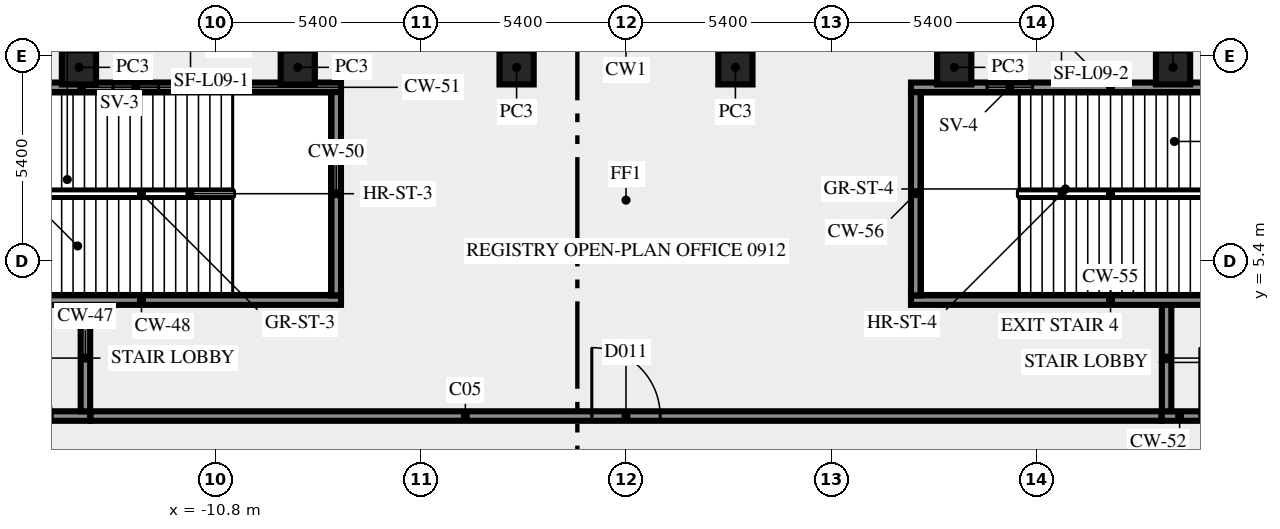
"""IFC4 building model, lengths in metres.
Left out: names, types, materials, properties, quantities, classifications, styles, units other than length and angle.
Written with IfcOpenShell. Run it as: python <this file> out.ifc"""

import sys

from ifc_helpers import new_model, si_unit, direction, frame, frame_2d, origin, origin_2d, place, context, subcontext, project, spatial, rectangle, extrude, element, fill, save


model = new_model("IFC4")
c1 = context("Model", 3, precision=1e-05, world=origin(), true_north=direction((0.0, 1.0)))
c2 = subcontext(c1, "Body", "Model", "MODEL_VIEW")
j1 = project(units=[si_unit("LENGTHUNIT", "METRE"), si_unit("PLANEANGLEUNIT", "RADIAN")], contexts=[c1])
p1 = place(None, origin())
s1 = spatial("IfcSite", under=j1, at=p1, CompositionType="ELEMENT")
p2 = place(p1, origin())
s2 = spatial("IfcBuilding", under=s1, at=p2, CompositionType="ELEMENT")
p3 = place(p2, frame((0.0, 0.0, 43.0)))
s3 = spatial("IfcBuildingStorey", under=s2, at=p3, CompositionType="ELEMENT", Elevation=43.0)
for number, where, z_axis, x_axis in (
    (1, (14.395, 10.5, 0.0), (0.0, 0.0, 1.0), (-1.0, 0.0, 0.0)),
    (2, (8.637, 10.5, 0.0), (0.0, 0.0, 1.0), (-1.0, 0.0, 0.0)),
    (3, (2.879, 10.5, 0.0), (0.0, 0.0, 1.0), (-1.0, 0.0, 0.0)),
    (4, (-2.879, 10.5, 0.0), (0.0, 0.0, 1.0), (-1.0, 0.0, 0.0)),
    (5, (-8.637, 10.5, 0.0), (0.0, 0.0, 1.0), (-1.0, 0.0, 0.0)),
    (6, (-14.395, 10.5, 0.0), (0.0, 0.0, 1.0), (-1.0, 0.0, 0.0)),
):
    element("IfcColumn", number, at=place(p3, frame(where, z_axis=z_axis, x_axis=x_axis)), inside=s3, PredefinedType="COLUMN", context=c2, shape_type="SweptSolid", body=[
        extrude(rectangle(XDim=0.9, YDim=0.9, at=origin_2d()), origin(), (0.0, 0.0, 1.0), 3.65),
    ])
p4 = place(p3, frame((-18.0, 1.325, 0.0), z_axis=(0.0, 0.0, 1.0), x_axis=(1.0, 0.0, 0.0)))
e7 = element("IfcWall", 7, at=p4, inside=s3, PredefinedType="SHEAR", context=c2, shape_type="SweptSolid", body=[
    extrude(rectangle(XDim=3.9, YDim=0.25, at=frame_2d((1.95, 0.0))), origin(), (0.0, 0.0, 1.0), 3.65),
])
p5 = place(p4, frame((1.1, 0.0, 0.0)))
e8 = element("IfcOpeningElement", 8, at=p5, cuts=e7, PredefinedType="OPENING", context=c2, shape_type="SweptSolid", body=[
    extrude(rectangle(XDim=1.8, YDim=2.1, at=frame_2d((0.9, 1.05))), frame((0.0, 0.135, 0.0), z_axis=(0.0, -1.0, 0.0), x_axis=(1.0, 0.0, 0.0)), (0.0, 0.0, 1.0), 0.27),
])
p6 = place(p3, frame((-14.225, 1.45, 0.0), z_axis=(0.0, 0.0, 1.0), x_axis=(0.0, 1.0, 0.0)))
e9 = element("IfcWall", 9, at=p6, inside=s3, PredefinedType="SHEAR", context=c2, shape_type="SweptSolid", body=[
    extrude(rectangle(XDim=2.8, YDim=0.25, at=frame_2d((1.4, 0.0))), origin(), (0.0, 0.0, 1.0), 3.65),
])
p7 = place(p3, frame((-18.0, 4.375, 0.0), z_axis=(0.0, 0.0, 1.0), x_axis=(1.0, 0.0, 0.0)))
e10 = element("IfcWall", 10, at=p7, inside=s3, PredefinedType="SHEAR", context=c2, shape_type="SweptSolid", body=[
    extrude(rectangle(XDim=10.5, YDim=0.25, at=frame_2d((5.25, 0.0))), origin(), (0.0, 0.0, 1.0), 3.65),
])
p8 = place(p7, frame((0.3, 0.0, 0.0)))
e11 = element("IfcOpeningElement", 11, at=p8, cuts=e10, PredefinedType="OPENING", context=c2, shape_type="SweptSolid", body=[
    extrude(rectangle(XDim=1.8, YDim=2.1, at=frame_2d((0.9, 1.05))), frame((0.0, 0.135, 0.0), z_axis=(0.0, -1.0, 0.0), x_axis=(1.0, 0.0, 0.0)), (0.0, 0.0, 1.0), 0.27),
])
p9 = place(p3, frame((-7.625, 4.5, 0.0), z_axis=(0.0, 0.0, 1.0), x_axis=(0.0, 1.0, 0.0)))
e12 = element("IfcWall", 12, at=p9, inside=s3, PredefinedType="SHEAR", context=c2, shape_type="SweptSolid", body=[
    extrude(rectangle(XDim=5.35, YDim=0.25, at=frame_2d((2.675, 0.0))), origin(), (0.0, 0.0, 1.0), 3.65),
])
p10 = place(p3, frame((-18.0, 9.975, 0.0), z_axis=(0.0, 0.0, 1.0), x_axis=(1.0, 0.0, 0.0)))
e13 = element("IfcWall", 13, at=p10, inside=s3, PredefinedType="SHEAR", context=c2, shape_type="SweptSolid", body=[
    extrude(rectangle(XDim=10.5, YDim=0.25, at=frame_2d((5.25, 0.0))), origin(), (0.0, 0.0, 1.0), 3.65),
])
p11 = place(p10, frame((4.5, 0.0, 1.0)))
e14 = element("IfcOpeningElement", 14, at=p11, cuts=e13, PredefinedType="OPENING", context=c2, shape_type="SweptSolid", body=[
    extrude(rectangle(XDim=1.2, YDim=1.2, at=frame_2d((0.6, 0.6))), frame((0.0, 0.135, 0.0), z_axis=(0.0, -1.0, 0.0), x_axis=(1.0, 0.0, 0.0)), (0.0, 0.0, 1.0), 0.27),
])
p12 = place(p3, frame((14.1, 1.325, 0.0), z_axis=(0.0, 0.0, 1.0), x_axis=(1.0, 0.0, 0.0)))
e15 = element("IfcWall", 15, at=p12, inside=s3, PredefinedType="SHEAR", context=c2, shape_type="SweptSolid", body=[
    extrude(rectangle(XDim=3.9, YDim=0.25, at=frame_2d((1.95, 0.0))), origin(), (0.0, 0.0, 1.0), 3.65),
])
p13 = place(p12, frame((1.0, 0.0, 0.0)))
e16 = element("IfcOpeningElement", 16, at=p13, cuts=e15, PredefinedType="OPENING", context=c2, shape_type="SweptSolid", body=[
    extrude(rectangle(XDim=1.8, YDim=2.1, at=frame_2d((0.9, 1.05))), frame((0.0, 0.135, 0.0), z_axis=(0.0, -1.0, 0.0), x_axis=(1.0, 0.0, 0.0)), (0.0, 0.0, 1.0), 0.27),
])
p14 = place(p3, frame((14.225, 1.45, 0.0), z_axis=(0.0, 0.0, 1.0), x_axis=(0.0, 1.0, 0.0)))
e17 = element("IfcWall", 17, at=p14, inside=s3, PredefinedType="SHEAR", context=c2, shape_type="SweptSolid", body=[
    extrude(rectangle(XDim=2.8, YDim=0.25, at=frame_2d((1.4, 0.0))), origin(), (0.0, 0.0, 1.0), 3.65),
])
p15 = place(p3, frame((7.5, 4.375, 0.0), z_axis=(0.0, 0.0, 1.0), x_axis=(1.0, 0.0, 0.0)))
e18 = element("IfcWall", 18, at=p15, inside=s3, PredefinedType="SHEAR", context=c2, shape_type="SweptSolid", body=[
    extrude(rectangle(XDim=10.5, YDim=0.25, at=frame_2d((5.25, 0.0))), origin(), (0.0, 0.0, 1.0), 3.65),
])
p16 = place(p15, frame((8.4, 0.0, 0.0)))
e19 = element("IfcOpeningElement", 19, at=p16, cuts=e18, PredefinedType="OPENING", context=c2, shape_type="SweptSolid", body=[
    extrude(rectangle(XDim=1.8, YDim=2.1, at=frame_2d((0.9, 1.05))), frame((0.0, 0.135, 0.0), z_axis=(0.0, -1.0, 0.0), x_axis=(1.0, 0.0, 0.0)), (0.0, 0.0, 1.0), 0.27),
])
p17 = place(p3, frame((7.625, 4.5, 0.0), z_axis=(0.0, 0.0, 1.0), x_axis=(0.0, 1.0, 0.0)))
e20 = element("IfcWall", 20, at=p17, inside=s3, PredefinedType="SHEAR", context=c2, shape_type="SweptSolid", body=[
    extrude(rectangle(XDim=5.35, YDim=0.25, at=frame_2d((2.675, 0.0))), origin(), (0.0, 0.0, 1.0), 3.65),
])
p18 = place(p3, frame((7.5, 9.975, 0.0), z_axis=(0.0, 0.0, 1.0), x_axis=(1.0, 0.0, 0.0)))
e21 = element("IfcWall", 21, at=p18, inside=s3, PredefinedType="SHEAR", context=c2, shape_type="SweptSolid", body=[
    extrude(rectangle(XDim=10.5, YDim=0.25, at=frame_2d((5.25, 0.0))), origin(), (0.0, 0.0, 1.0), 3.65),
])
p19 = place(p18, frame((2.0, 0.0, 1.0)))
e22 = element("IfcOpeningElement", 22, at=p19, cuts=e21, PredefinedType="OPENING", context=c2, shape_type="SweptSolid", body=[
    extrude(rectangle(XDim=1.2, YDim=1.2, at=frame_2d((0.6, 0.6))), frame((0.0, 0.135, 0.0), z_axis=(0.0, -1.0, 0.0), x_axis=(1.0, 0.0, 0.0)), (0.0, 0.0, 1.0), 0.27),
])
p20 = place(p3, frame((-14.09, 1.325, 0.0), z_axis=(0.0, 0.0, 1.0), x_axis=(1.0, 0.0, 0.0)))
e23 = element("IfcWall", 23, at=p20, inside=s3, PredefinedType="SOLIDWALL", context=c2, shape_type="SweptSolid", body=[
    extrude(rectangle(XDim=28.18, YDim=0.25, at=frame_2d((14.09, 0.0))), origin(), (0.0, 0.0, 1.0), 3.65),
])
p21 = place(p20, frame((13.19, 0.0, 0.0)))
e24 = element("IfcOpeningElement", 24, at=p21, cuts=e23, PredefinedType="OPENING", context=c2, shape_type="SweptSolid", body=[
    extrude(rectangle(XDim=1.8, YDim=2.1, at=frame_2d((0.9, 1.05))), frame((0.0, 0.135, 0.0), z_axis=(0.0, -1.0, 0.0), x_axis=(1.0, 0.0, 0.0)), (0.0, 0.0, 1.0), 0.27),
])
p22 = place(p5, origin())
e25 = element("IfcDoor", 25, at=p22, inside=s3, OperationType="DOUBLE_DOOR_SINGLE_SWING", PredefinedType="DOOR", context=c2, shape_type="SweptSolid", body=[
    extrude(rectangle(XDim=1.8, YDim=2.1, at=frame_2d((0.9, 1.05))), frame((0.0, 0.025, 0.0), z_axis=(0.0, -1.0, 0.0), x_axis=(1.0, 0.0, 0.0)), (0.0, 0.0, 1.0), 0.05),
])
fill(e8, e25)
p23 = place(p11, origin())
e26 = element("IfcWindow", 26, at=p23, inside=s3, PartitioningType="SINGLE_PANEL", PredefinedType="WINDOW", context=c2, shape_type="SweptSolid", body=[
    extrude(rectangle(XDim=1.2, YDim=1.2, at=frame_2d((0.6, 0.6))), frame((0.0, 0.03, 0.0), z_axis=(0.0, -1.0, 0.0), x_axis=(1.0, 0.0, 0.0)), (0.0, 0.0, 1.0), 0.06),
])
fill(e14, e26)
p24 = place(p13, origin())
e27 = element("IfcDoor", 27, at=p24, inside=s3, OperationType="DOUBLE_DOOR_SINGLE_SWING", PredefinedType="DOOR", context=c2, shape_type="SweptSolid", body=[
    extrude(rectangle(XDim=1.8, YDim=2.1, at=frame_2d((0.9, 1.05))), frame((0.0, 0.025, 0.0), z_axis=(0.0, -1.0, 0.0), x_axis=(1.0, 0.0, 0.0)), (0.0, 0.0, 1.0), 0.05),
])
fill(e16, e27)
p25 = place(p19, origin())
e28 = element("IfcWindow", 28, at=p25, inside=s3, PartitioningType="SINGLE_PANEL", PredefinedType="WINDOW", context=c2, shape_type="SweptSolid", body=[
    extrude(rectangle(XDim=1.2, YDim=1.2, at=frame_2d((0.6, 0.6))), frame((0.0, 0.03, 0.0), z_axis=(0.0, -1.0, 0.0), x_axis=(1.0, 0.0, 0.0)), (0.0, 0.0, 1.0), 0.06),
])
fill(e22, e28)
p26 = place(p21, origin())
e29 = element("IfcDoor", 29, at=p26, inside=s3, OperationType="DOUBLE_DOOR_SINGLE_SWING", PredefinedType="DOOR", context=c2, shape_type="SweptSolid", body=[
    extrude(rectangle(XDim=1.8, YDim=2.1, at=frame_2d((0.9, 1.05))), frame((0.0, 0.025, 0.0), z_axis=(0.0, -1.0, 0.0), x_axis=(1.0, 0.0, 0.0)), (0.0, 0.0, 1.0), 0.05),
])
fill(e24, e29)
save(model, sys.argv[1])
